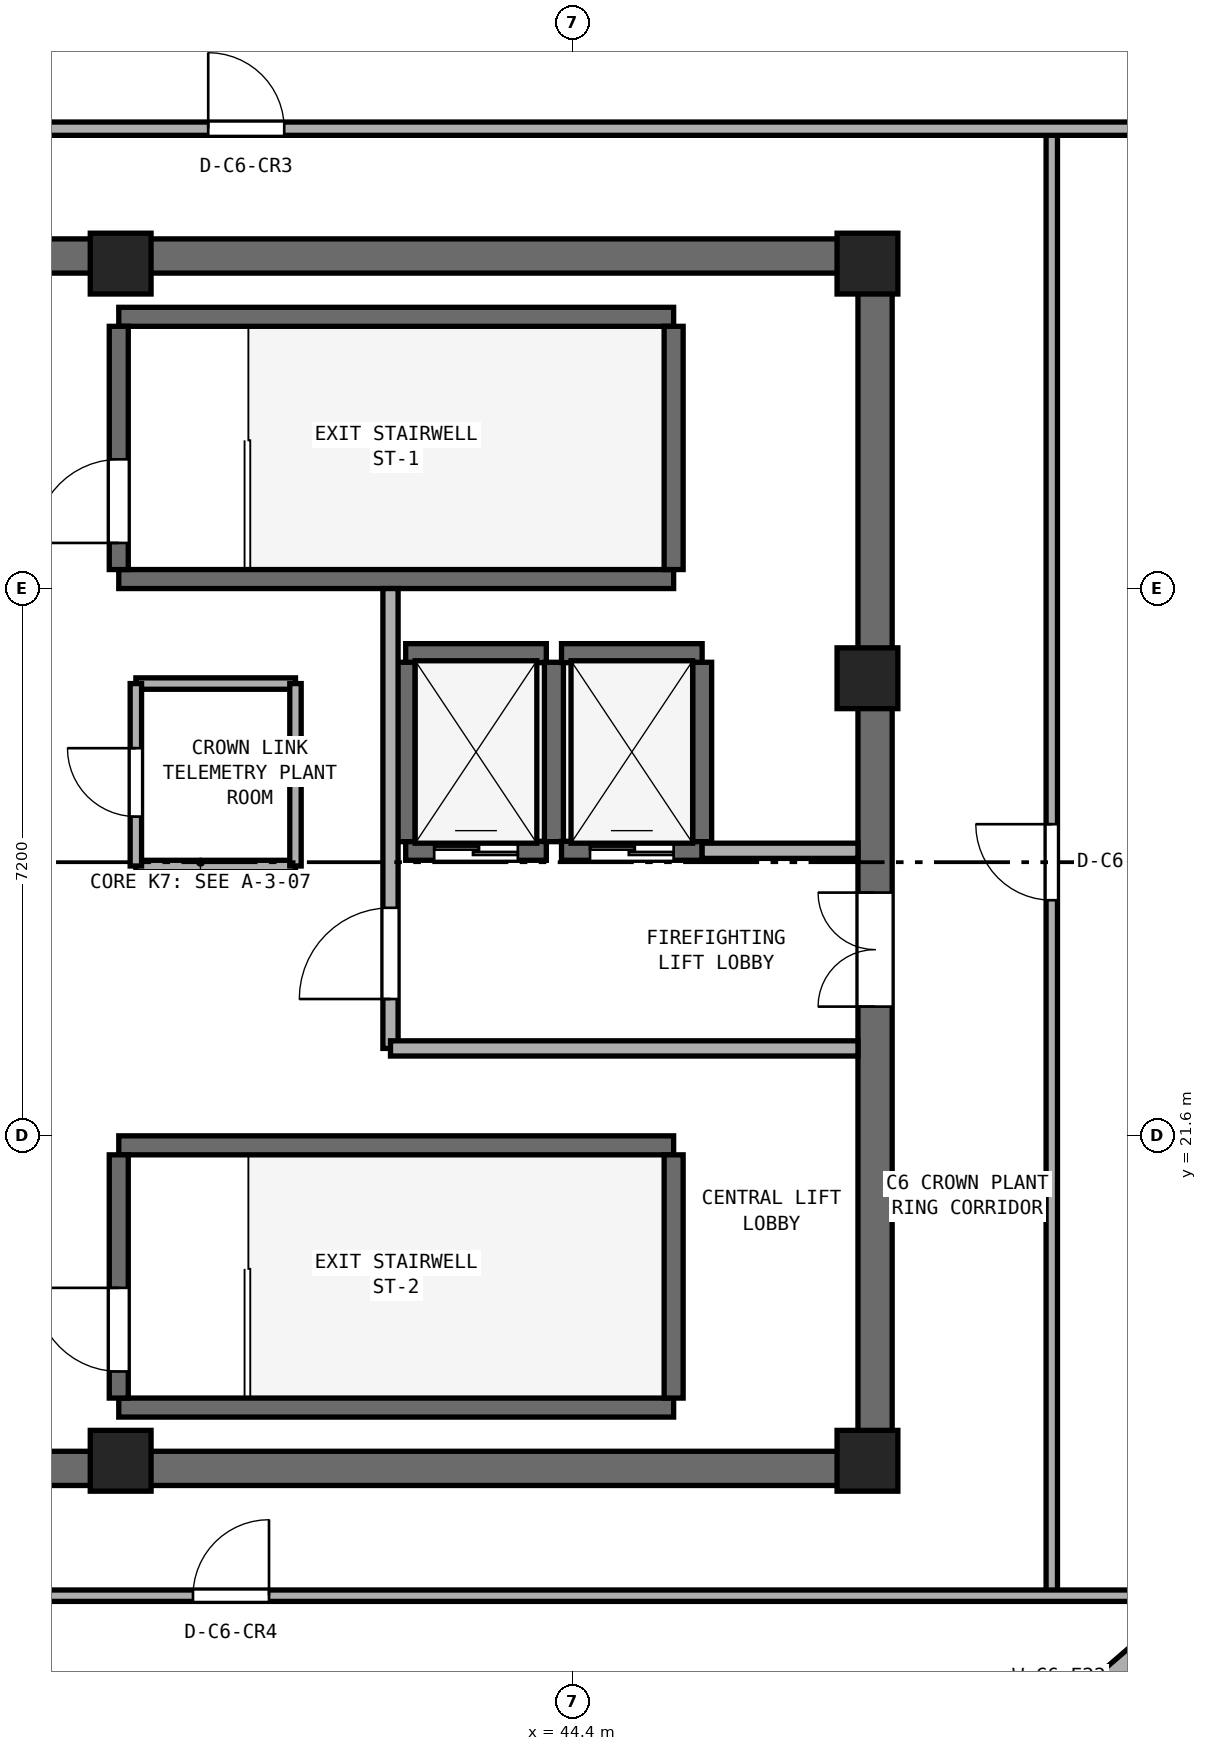
"""IFC4 building model, lengths in metres.
Left out: names, types, materials, properties, quantities, classifications, styles, units other than length and angle.
Written with IfcOpenShell. Run it as: python <this file> out.ifc"""

import sys

from ifc_helpers import new_model, si_unit, direction, frame, frame_2d, origin, origin_2d, place, context, subcontext, project, spatial, rectangle, extrude, element, fill, save


model = new_model("IFC4")
c1 = context("Model", 3, precision=1e-05, world=origin(), true_north=direction((0.0, 1.0)))
c2 = subcontext(c1, "Body", "Model", "MODEL_VIEW")
j1 = project(units=[si_unit("LENGTHUNIT", "METRE"), si_unit("PLANEANGLEUNIT", "RADIAN")], contexts=[c1])
p1 = place(None, origin())
s1 = spatial("IfcSite", under=j1, at=p1, CompositionType="ELEMENT")
p2 = place(p1, origin())
s2 = spatial("IfcBuilding", under=s1, at=p2, CompositionType="ELEMENT")
p3 = place(p2, frame((0.0, 0.0, 333.4)))
s3 = spatial("IfcBuildingStorey", under=s2, at=p3, CompositionType="ELEMENT", Elevation=333.4)
for number, where, z_axis, x_axis in (
    (1, (30.4, 17.225, 0.0), (0.0, 0.0, 1.0), (1.0, 0.0, 0.0)),
    (2, (30.4, 33.175, 0.0), (0.0, 0.0, 1.0), (1.0, 0.0, 0.0)),
):
    element("IfcWall", number, at=place(p3, frame(where, z_axis=z_axis, x_axis=x_axis)), inside=s3, PredefinedType="SHEAR", context=c2, shape_type="SweptSolid", body=[
        extrude(rectangle(XDim=18.2, YDim=0.45, at=frame_2d((9.1, 0.0))), origin(), (0.0, 0.0, 1.0), 3.7),
    ])
p4 = place(p3, frame((48.375, 17.45, 0.0), z_axis=(0.0, 0.0, 1.0), x_axis=(0.0, 1.0, 0.0)))
e3 = element("IfcWall", 3, at=p4, inside=s3, PredefinedType="SHEAR", context=c2, shape_type="SweptSolid", body=[
    extrude(rectangle(XDim=15.5, YDim=0.45, at=frame_2d((7.75, 0.0))), origin(), (0.0, 0.0, 1.0), 3.7),
])
p5 = place(p4, frame((5.85, 0.0, 0.0)))
e4 = element("IfcOpeningElement", 4, at=p5, cuts=e3, PredefinedType="OPENING", context=c2, shape_type="SweptSolid", body=[
    extrude(rectangle(XDim=1.5, YDim=2.15, at=frame_2d((0.75, 1.075))), frame((0.0, 0.235, 0.0), z_axis=(0.0, -1.0, 0.0), x_axis=(1.0, 0.0, 0.0)), (0.0, 0.0, 1.0), 0.47),
])
for number, where, z_axis, x_axis in (
    (5, (38.45, 17.325, 0.0), (0.0, 0.0, 1.0), (1.0, 0.0, 0.0)),
    (6, (48.275, 17.325, 0.0), (0.0, 0.0, 1.0), (1.0, 0.0, 0.0)),
    (7, (48.275, 27.62, 0.0), (0.0, 0.0, 1.0), (1.0, 0.0, 0.0)),
    (8, (48.275, 33.075, 0.0), (0.0, 0.0, 1.0), (1.0, 0.0, 0.0)),
    (9, (38.45, 33.075, 0.0), (0.0, 0.0, 1.0), (1.0, 0.0, 0.0)),
):
    element("IfcColumn", number, at=place(p3, frame(where, z_axis=z_axis, x_axis=x_axis)), inside=s3, PredefinedType="PILASTER", context=c2, shape_type="SweptSolid", body=[
        extrude(rectangle(XDim=0.8, YDim=0.8, at=origin_2d()), origin(), (0.0, 0.0, 1.0), 4.0),
    ])
for number, where, z_axis, x_axis in (
    (10, (38.425, 28.925, 0.0), (0.0, 0.0, 1.0), (1.0, 0.0, 0.0)),
    (11, (38.425, 32.375, 0.0), (0.0, 0.0, 1.0), (1.0, 0.0, 0.0)),
):
    element("IfcWall", number, at=place(p3, frame(where, z_axis=z_axis, x_axis=x_axis)), inside=s3, PredefinedType="SHEAR", context=c2, shape_type="SweptSolid", body=[
        extrude(rectangle(XDim=7.3, YDim=0.25, at=frame_2d((3.65, 0.0))), origin(), (0.0, 0.0, 1.0), 3.7),
    ])
p6 = place(p3, frame((38.425, 29.05, 0.0), z_axis=(0.0, 0.0, 1.0), x_axis=(0.0, 1.0, 0.0)))
e12 = element("IfcWall", 12, at=p6, inside=s3, PredefinedType="SHEAR", context=c2, shape_type="SweptSolid", body=[
    extrude(rectangle(XDim=3.2, YDim=0.25, at=frame_2d((1.6, 0.0))), origin(), (0.0, 0.0, 1.0), 3.7),
])
p7 = place(p6, frame((0.35, 0.0, 0.0)))
e13 = element("IfcOpeningElement", 13, at=p7, cuts=e12, PredefinedType="OPENING", context=c2, shape_type="SweptSolid", body=[
    extrude(rectangle(XDim=1.1, YDim=2.15, at=frame_2d((0.55, 1.075))), frame((0.0, 0.135, 0.0), z_axis=(0.0, -1.0, 0.0), x_axis=(1.0, 0.0, 0.0)), (0.0, 0.0, 1.0), 0.27),
])
p8 = place(p3, frame((45.725, 29.05, 0.0), z_axis=(0.0, 0.0, 1.0), x_axis=(0.0, 1.0, 0.0)))
e14 = element("IfcWall", 14, at=p8, inside=s3, PredefinedType="SHEAR", context=c2, shape_type="SweptSolid", body=[
    extrude(rectangle(XDim=3.2, YDim=0.25, at=frame_2d((1.6, 0.0))), origin(), (0.0, 0.0, 1.0), 3.7),
])
for number, where, z_axis, x_axis in (
    (15, (38.425, 18.025, 0.0), (0.0, 0.0, 1.0), (1.0, 0.0, 0.0)),
    (16, (38.425, 21.475, 0.0), (0.0, 0.0, 1.0), (1.0, 0.0, 0.0)),
):
    element("IfcWall", number, at=place(p3, frame(where, z_axis=z_axis, x_axis=x_axis)), inside=s3, PredefinedType="SHEAR", context=c2, shape_type="SweptSolid", body=[
        extrude(rectangle(XDim=7.3, YDim=0.25, at=frame_2d((3.65, 0.0))), origin(), (0.0, 0.0, 1.0), 3.7),
    ])
p9 = place(p3, frame((38.425, 18.15, 0.0), z_axis=(0.0, 0.0, 1.0), x_axis=(0.0, 1.0, 0.0)))
e17 = element("IfcWall", 17, at=p9, inside=s3, PredefinedType="SHEAR", context=c2, shape_type="SweptSolid", body=[
    extrude(rectangle(XDim=3.2, YDim=0.25, at=frame_2d((1.6, 0.0))), origin(), (0.0, 0.0, 1.0), 3.7),
])
p10 = place(p9, frame((0.35, 0.0, 0.0)))
e18 = element("IfcOpeningElement", 18, at=p10, cuts=e17, PredefinedType="OPENING", context=c2, shape_type="SweptSolid", body=[
    extrude(rectangle(XDim=1.1, YDim=2.15, at=frame_2d((0.55, 1.075))), frame((0.0, 0.135, 0.0), z_axis=(0.0, -1.0, 0.0), x_axis=(1.0, 0.0, 0.0)), (0.0, 0.0, 1.0), 0.27),
])
p11 = place(p3, frame((45.725, 18.15, 0.0), z_axis=(0.0, 0.0, 1.0), x_axis=(0.0, 1.0, 0.0)))
e19 = element("IfcWall", 19, at=p11, inside=s3, PredefinedType="SHEAR", context=c2, shape_type="SweptSolid", body=[
    extrude(rectangle(XDim=3.2, YDim=0.25, at=frame_2d((1.6, 0.0))), origin(), (0.0, 0.0, 1.0), 3.7),
])
p12 = place(p3, frame((42.2, 25.35, 0.0), z_axis=(0.0, 0.0, 1.0), x_axis=(1.0, 0.0, 0.0)))
e20 = element("IfcWall", 20, at=p12, inside=s3, PredefinedType="SHEAR", context=c2, shape_type="SweptSolid", body=[
    extrude(rectangle(XDim=1.85, YDim=0.25, at=frame_2d((0.925, 0.0))), origin(), (0.0, 0.0, 1.0), 3.7),
])
p13 = place(p12, frame((0.375, 0.0, 0.0)))
e21 = element("IfcOpeningElement", 21, at=p13, cuts=e20, PredefinedType="OPENING", context=c2, shape_type="SweptSolid", body=[
    extrude(rectangle(XDim=1.1, YDim=2.15, at=frame_2d((0.55, 1.075))), frame((0.0, 0.135, 0.0), z_axis=(0.0, -1.0, 0.0), x_axis=(1.0, 0.0, 0.0)), (0.0, 0.0, 1.0), 0.27),
])
p14 = place(p3, frame((42.2, 27.95, 0.0), z_axis=(0.0, 0.0, 1.0), x_axis=(1.0, 0.0, 0.0)))
e22 = element("IfcWall", 22, at=p14, inside=s3, PredefinedType="SHEAR", context=c2, shape_type="SweptSolid", body=[
    extrude(rectangle(XDim=1.85, YDim=0.25, at=frame_2d((0.925, 0.0))), origin(), (0.0, 0.0, 1.0), 3.7),
])
for number, where, z_axis, x_axis in (
    (23, (42.2, 25.47, 0.0), (0.0, 0.0, 1.0), (0.0, 1.0, 0.0)),
    (24, (44.15, 25.47, 0.0), (0.0, 0.0, 1.0), (0.0, 1.0, 0.0)),
):
    element("IfcWall", number, at=place(p3, frame(where, z_axis=z_axis, x_axis=x_axis)), inside=s3, PredefinedType="SHEAR", context=c2, shape_type="SweptSolid", body=[
        extrude(rectangle(XDim=2.36, YDim=0.25, at=frame_2d((1.18, 0.0))), origin(), (0.0, 0.0, 1.0), 3.7),
    ])
p15 = place(p3, frame((44.25, 25.35, 0.0), z_axis=(0.0, 0.0, 1.0), x_axis=(1.0, 0.0, 0.0)))
e25 = element("IfcWall", 25, at=p15, inside=s3, PredefinedType="SHEAR", context=c2, shape_type="SweptSolid", body=[
    extrude(rectangle(XDim=1.85, YDim=0.25, at=frame_2d((0.925, 0.0))), origin(), (0.0, 0.0, 1.0), 3.7),
])
p16 = place(p15, frame((0.375, 0.0, 0.0)))
e26 = element("IfcOpeningElement", 26, at=p16, cuts=e25, PredefinedType="OPENING", context=c2, shape_type="SweptSolid", body=[
    extrude(rectangle(XDim=1.1, YDim=2.15, at=frame_2d((0.55, 1.075))), frame((0.0, 0.135, 0.0), z_axis=(0.0, -1.0, 0.0), x_axis=(1.0, 0.0, 0.0)), (0.0, 0.0, 1.0), 0.27),
])
p17 = place(p3, frame((44.25, 27.95, 0.0), z_axis=(0.0, 0.0, 1.0), x_axis=(1.0, 0.0, 0.0)))
e27 = element("IfcWall", 27, at=p17, inside=s3, PredefinedType="SHEAR", context=c2, shape_type="SweptSolid", body=[
    extrude(rectangle(XDim=1.85, YDim=0.25, at=frame_2d((0.925, 0.0))), origin(), (0.0, 0.0, 1.0), 3.7),
])
p18 = place(p3, frame((46.1, 25.47, 0.0), z_axis=(0.0, 0.0, 1.0), x_axis=(0.0, 1.0, 0.0)))
e28 = element("IfcWall", 28, at=p18, inside=s3, PredefinedType="SHEAR", context=c2, shape_type="SweptSolid", body=[
    extrude(rectangle(XDim=2.36, YDim=0.25, at=frame_2d((1.18, 0.0))), origin(), (0.0, 0.0, 1.0), 3.7),
])
p19 = place(p3, frame((42.0, 22.75, 0.0), z_axis=(0.0, 0.0, 1.0), x_axis=(0.0, 1.0, 0.0)))
e29 = element("IfcWall", 29, at=p19, inside=s3, PredefinedType="SOLIDWALL", context=c2, shape_type="SweptSolid", body=[
    extrude(rectangle(XDim=6.05, YDim=0.2, at=frame_2d((3.025, 0.0))), origin(), (0.0, 0.0, 1.0), 3.7),
])
p20 = place(p19, frame((0.65, 0.0, 0.0)))
e30 = element("IfcOpeningElement", 30, at=p20, cuts=e29, PredefinedType="OPENING", context=c2, shape_type="SweptSolid", body=[
    extrude(rectangle(XDim=1.2, YDim=2.15, at=frame_2d((0.6, 1.075))), frame((0.0, 0.11, 0.0), z_axis=(0.0, -1.0, 0.0), x_axis=(1.0, 0.0, 0.0)), (0.0, 0.0, 1.0), 0.22),
])
p21 = place(p3, frame((42.0, 22.75, 0.0), z_axis=(0.0, 0.0, 1.0), x_axis=(1.0, 0.0, 0.0)))
e31 = element("IfcWall", 31, at=p21, inside=s3, PredefinedType="SOLIDWALL", context=c2, shape_type="SweptSolid", body=[
    extrude(rectangle(XDim=6.15, YDim=0.2, at=frame_2d((3.075, 0.0))), origin(), (0.0, 0.0, 1.0), 3.7),
])
p22 = place(p3, frame((46.1, 25.35, 0.0), z_axis=(0.0, 0.0, 1.0), x_axis=(1.0, 0.0, 0.0)))
e32 = element("IfcWall", 32, at=p22, inside=s3, PredefinedType="SOLIDWALL", context=c2, shape_type="SweptSolid", body=[
    extrude(rectangle(XDim=2.05, YDim=0.2, at=frame_2d((1.025, 0.0))), origin(), (0.0, 0.0, 1.0), 3.7),
])
for number, where, z_axis, x_axis in (
    (33, (38.65, 25.15, 0.0), (0.0, 0.0, 1.0), (1.0, 0.0, 0.0)),
    (34, (38.65, 27.55, 0.0), (0.0, 0.0, 1.0), (1.0, 0.0, 0.0)),
):
    element("IfcWall", number, at=place(p3, frame(where, z_axis=z_axis, x_axis=x_axis)), inside=s3, PredefinedType="PARTITIONING", context=c2, shape_type="SweptSolid", body=[
        extrude(rectangle(XDim=2.1, YDim=0.15, at=frame_2d((1.05, 0.0))), origin(), (0.0, 0.0, 1.0), 3.7),
    ])
p23 = place(p3, frame((38.65, 25.15, 0.0), z_axis=(0.0, 0.0, 1.0), x_axis=(0.0, 1.0, 0.0)))
e35 = element("IfcWall", 35, at=p23, inside=s3, PredefinedType="PARTITIONING", context=c2, shape_type="SweptSolid", body=[
    extrude(rectangle(XDim=2.4, YDim=0.15, at=frame_2d((1.2, 0.0))), origin(), (0.0, 0.0, 1.0), 3.7),
])
p24 = place(p23, frame((0.65, 0.0, 0.0)))
e36 = element("IfcOpeningElement", 36, at=p24, cuts=e35, PredefinedType="OPENING", context=c2, shape_type="SweptSolid", body=[
    extrude(rectangle(XDim=0.9, YDim=2.1, at=frame_2d((0.45, 1.05))), frame((0.0, 0.085, 0.0), z_axis=(0.0, -1.0, 0.0), x_axis=(1.0, 0.0, 0.0)), (0.0, 0.0, 1.0), 0.17),
])
p25 = place(p3, frame((40.75, 25.15, 0.0), z_axis=(0.0, 0.0, 1.0), x_axis=(0.0, 1.0, 0.0)))
e37 = element("IfcWall", 37, at=p25, inside=s3, PredefinedType="PARTITIONING", context=c2, shape_type="SweptSolid", body=[
    extrude(rectangle(XDim=2.4, YDim=0.15, at=frame_2d((1.2, 0.0))), origin(), (0.0, 0.0, 1.0), 3.7),
])
p26 = place(p3, frame((50.7, 15.55, 0.0), z_axis=(0.0, 0.0, 1.0), x_axis=(0.0, 1.0, 0.0)))
e38 = element("IfcWall", 38, at=p26, inside=s3, PredefinedType="PARTITIONING", context=c2, shape_type="SweptSolid", body=[
    extrude(rectangle(XDim=19.3, YDim=0.15, at=frame_2d((9.65, 0.0))), origin(), (0.0, 0.0, 1.0), 3.7),
])
p27 = place(p26, frame((9.15, 0.0, 0.0)))
e39 = element("IfcOpeningElement", 39, at=p27, cuts=e38, PredefinedType="OPENING", context=c2, shape_type="SweptSolid", body=[
    extrude(rectangle(XDim=1.0, YDim=2.12, at=frame_2d((0.5, 1.06))), frame((0.0, 0.085, 0.0), z_axis=(0.0, -1.0, 0.0), x_axis=(1.0, 0.0, 0.0)), (0.0, 0.0, 1.0), 0.17),
])
p28 = place(p3, frame((28.818, 15.55, 0.0), z_axis=(0.0, 0.0, 1.0), x_axis=(1.0, 0.0, 0.0)))
e40 = element("IfcWall", 40, at=p28, inside=s3, PredefinedType="PARTITIONING", context=c2, shape_type="SweptSolid", body=[
    extrude(rectangle(XDim=23.98, YDim=0.15, at=frame_2d((11.99, 0.0))), origin(), (0.0, 0.0, 1.0), 3.7),
])
p29 = place(p28, frame((10.583, 0.0, 0.0)))
e41 = element("IfcOpeningElement", 41, at=p29, cuts=e40, PredefinedType="OPENING", context=c2, shape_type="SweptSolid", body=[
    extrude(rectangle(XDim=1.0, YDim=2.12, at=frame_2d((0.5, 1.06))), frame((0.0, 0.085, 0.0), z_axis=(0.0, -1.0, 0.0), x_axis=(1.0, 0.0, 0.0)), (0.0, 0.0, 1.0), 0.17),
])
p30 = place(p3, frame((29.236, 34.85, 0.0), z_axis=(0.0, 0.0, 1.0), x_axis=(1.0, 0.0, 0.0)))
e42 = element("IfcWall", 42, at=p30, inside=s3, PredefinedType="PARTITIONING", context=c2, shape_type="SweptSolid", body=[
    extrude(rectangle(XDim=24.422, YDim=0.175, at=frame_2d((12.211, 0.0))), origin(), (0.0, 0.0, 1.0), 3.7),
])
p31 = place(p30, frame((10.365, 0.0, 0.0)))
e43 = element("IfcOpeningElement", 43, at=p31, cuts=e42, PredefinedType="OPENING", context=c2, shape_type="SweptSolid", body=[
    extrude(rectangle(XDim=1.0, YDim=2.12, at=frame_2d((0.5, 1.06))), frame((0.0, 0.097, 0.0), z_axis=(0.0, -1.0, 0.0), x_axis=(1.0, 0.0, 0.0)), (0.0, 0.0, 1.0), 0.195),
])
p32 = place(p3, frame((46.921, 10.533, 0.0), z_axis=(0.0, 0.0, 1.0), x_axis=(0.756489047049, 0.654006362121, 0.0)))
e44 = element("IfcWall", 44, at=p32, inside=s3, PredefinedType="STANDARD", context=c2, shape_type="SweptSolid", body=[
    extrude(rectangle(XDim=10.244, YDim=0.28, at=frame_2d((5.122, 0.0))), origin(), (0.0, 0.0, 1.0), 3.7),
])
p33 = place(p32, frame((1.24, 0.0, 0.9)))
e45 = element("IfcOpeningElement", 45, at=p33, cuts=e44, PredefinedType="OPENING", context=c2, shape_type="SweptSolid", body=[
    extrude(rectangle(XDim=1.6, YDim=1.45, at=frame_2d((0.8, 0.725))), frame((0.0, 0.15, 0.0), z_axis=(0.0, -1.0, 0.0), x_axis=(1.0, 0.0, 0.0)), (0.0, 0.0, 1.0), 0.3),
])
p34 = place(p32, frame((4.322, 0.0, 0.9)))
e46 = element("IfcOpeningElement", 46, at=p34, cuts=e44, PredefinedType="OPENING", context=c2, shape_type="SweptSolid", body=[
    extrude(rectangle(XDim=1.6, YDim=1.45, at=frame_2d((0.8, 0.725))), frame((0.0, 0.15, 0.0), z_axis=(0.0, -1.0, 0.0), x_axis=(1.0, 0.0, 0.0)), (0.0, 0.0, 1.0), 0.3),
])
p35 = place(p32, frame((8.183, 0.0, 0.9)))
e47 = element("IfcOpeningElement", 47, at=p35, cuts=e44, PredefinedType="OPENING", context=c2, shape_type="SweptSolid", body=[
    extrude(rectangle(XDim=1.6, YDim=1.45, at=frame_2d((0.8, 0.725))), frame((0.0, 0.15, 0.0), z_axis=(0.0, -1.0, 0.0), x_axis=(1.0, 0.0, 0.0)), (0.0, 0.0, 1.0), 0.3),
])
p36 = place(p3, frame((54.543, 34.102, 0.0), z_axis=(0.0, 0.0, 1.0), x_axis=(-0.792926835332, 0.609316858302, 0.0)))
e48 = element("IfcWall", 48, at=p36, inside=s3, PredefinedType="STANDARD", context=c2, shape_type="SweptSolid", body=[
    extrude(rectangle(XDim=9.647, YDim=0.28, at=frame_2d((4.823, 0.0))), origin(), (0.0, 0.0, 1.0), 3.7),
])
p37 = place(p36, frame((4.023, 0.0, 0.9)))
e49 = element("IfcOpeningElement", 49, at=p37, cuts=e48, PredefinedType="OPENING", context=c2, shape_type="SweptSolid", body=[
    extrude(rectangle(XDim=1.6, YDim=1.45, at=frame_2d((0.8, 0.725))), frame((0.0, 0.15, 0.0), z_axis=(0.0, -1.0, 0.0), x_axis=(1.0, 0.0, 0.0)), (0.0, 0.0, 1.0), 0.3),
])
p38 = place(p36, frame((6.906, 0.0, 0.9)))
e50 = element("IfcOpeningElement", 50, at=p38, cuts=e48, PredefinedType="OPENING", context=c2, shape_type="SweptSolid", body=[
    extrude(rectangle(XDim=1.6, YDim=1.45, at=frame_2d((0.8, 0.725))), frame((0.0, 0.15, 0.0), z_axis=(0.0, -1.0, 0.0), x_axis=(1.0, 0.0, 0.0)), (0.0, 0.0, 1.0), 0.3),
])
p39 = place(p7, origin())
e51 = element("IfcDoor", 51, at=p39, inside=s3, OperationType="SINGLE_SWING_LEFT", PredefinedType="DOOR", context=c2, shape_type="SweptSolid", body=[
    extrude(rectangle(XDim=1.1, YDim=2.15, at=frame_2d((0.55, 1.075))), frame((0.0, 0.025, 0.0), z_axis=(0.0, -1.0, 0.0), x_axis=(1.0, 0.0, 0.0)), (0.0, 0.0, 1.0), 0.05),
])
fill(e13, e51)
p40 = place(p10, origin())
e52 = element("IfcDoor", 52, at=p40, inside=s3, OperationType="SINGLE_SWING_RIGHT", PredefinedType="DOOR", context=c2, shape_type="SweptSolid", body=[
    extrude(rectangle(XDim=1.1, YDim=2.15, at=frame_2d((0.55, 1.075))), frame((0.0, 0.025, 0.0), z_axis=(0.0, -1.0, 0.0), x_axis=(1.0, 0.0, 0.0)), (0.0, 0.0, 1.0), 0.05),
])
fill(e18, e52)
p41 = place(p13, origin())
e53 = element("IfcDoor", 53, at=p41, inside=s3, OperationType="DOUBLE_DOOR_SLIDING", PredefinedType="DOOR", context=c2, shape_type="SweptSolid", body=[
    extrude(rectangle(XDim=1.1, YDim=2.15, at=frame_2d((0.55, 1.075))), frame((0.0, 0.025, 0.0), z_axis=(0.0, -1.0, 0.0), x_axis=(1.0, 0.0, 0.0)), (0.0, 0.0, 1.0), 0.05),
])
fill(e21, e53)
p42 = place(p16, origin())
e54 = element("IfcDoor", 54, at=p42, inside=s3, OperationType="DOUBLE_DOOR_SLIDING", PredefinedType="DOOR", context=c2, shape_type="SweptSolid", body=[
    extrude(rectangle(XDim=1.1, YDim=2.15, at=frame_2d((0.55, 1.075))), frame((0.0, 0.025, 0.0), z_axis=(0.0, -1.0, 0.0), x_axis=(1.0, 0.0, 0.0)), (0.0, 0.0, 1.0), 0.05),
])
fill(e26, e54)
p43 = place(p20, origin())
e55 = element("IfcDoor", 55, at=p43, inside=s3, OperationType="SINGLE_SWING_LEFT", PredefinedType="DOOR", context=c2, shape_type="SweptSolid", body=[
    extrude(rectangle(XDim=1.2, YDim=2.15, at=frame_2d((0.6, 1.075))), frame((0.0, 0.025, 0.0), z_axis=(0.0, -1.0, 0.0), x_axis=(1.0, 0.0, 0.0)), (0.0, 0.0, 1.0), 0.05),
])
fill(e30, e55)
p44 = place(p5, origin())
e56 = element("IfcDoor", 56, at=p44, inside=s3, OperationType="DOUBLE_DOOR_SINGLE_SWING", PredefinedType="DOOR", context=c2, shape_type="SweptSolid", body=[
    extrude(rectangle(XDim=1.5, YDim=2.15, at=frame_2d((0.75, 1.075))), frame((0.0, 0.025, 0.0), z_axis=(0.0, -1.0, 0.0), x_axis=(1.0, 0.0, 0.0)), (0.0, 0.0, 1.0), 0.05),
])
fill(e4, e56)
p45 = place(p24, origin())
e57 = element("IfcDoor", 57, at=p45, inside=s3, OperationType="SINGLE_SWING_RIGHT", PredefinedType="DOOR", context=c2, shape_type="SweptSolid", body=[
    extrude(rectangle(XDim=0.9, YDim=2.1, at=frame_2d((0.45, 1.05))), frame((0.0, 0.025, 0.0), z_axis=(0.0, -1.0, 0.0), x_axis=(1.0, 0.0, 0.0)), (0.0, 0.0, 1.0), 0.05),
])
fill(e36, e57)
p46 = place(p27, origin())
e58 = element("IfcDoor", 58, at=p46, inside=s3, OperationType="SINGLE_SWING_RIGHT", PredefinedType="DOOR", context=c2, shape_type="SweptSolid", body=[
    extrude(rectangle(XDim=1.0, YDim=2.12, at=frame_2d((0.5, 1.06))), frame((0.0, 0.025, 0.0), z_axis=(0.0, -1.0, 0.0), x_axis=(1.0, 0.0, 0.0)), (0.0, 0.0, 1.0), 0.05),
])
fill(e39, e58)
p47 = place(p31, origin())
e59 = element("IfcDoor", 59, at=p47, inside=s3, OperationType="SINGLE_SWING_LEFT", PredefinedType="DOOR", context=c2, shape_type="SweptSolid", body=[
    extrude(rectangle(XDim=1.0, YDim=2.12, at=frame_2d((0.5, 1.06))), frame((0.0, 0.025, 0.0), z_axis=(0.0, -1.0, 0.0), x_axis=(1.0, 0.0, 0.0)), (0.0, 0.0, 1.0), 0.05),
])
fill(e43, e59)
p48 = place(p29, origin())
e60 = element("IfcDoor", 60, at=p48, inside=s3, OperationType="SINGLE_SWING_RIGHT", PredefinedType="DOOR", context=c2, shape_type="SweptSolid", body=[
    extrude(rectangle(XDim=1.0, YDim=2.12, at=frame_2d((0.5, 1.06))), frame((0.0, 0.025, 0.0), z_axis=(0.0, -1.0, 0.0), x_axis=(1.0, 0.0, 0.0)), (0.0, 0.0, 1.0), 0.05),
])
fill(e41, e60)
save(model, sys.argv[1])
